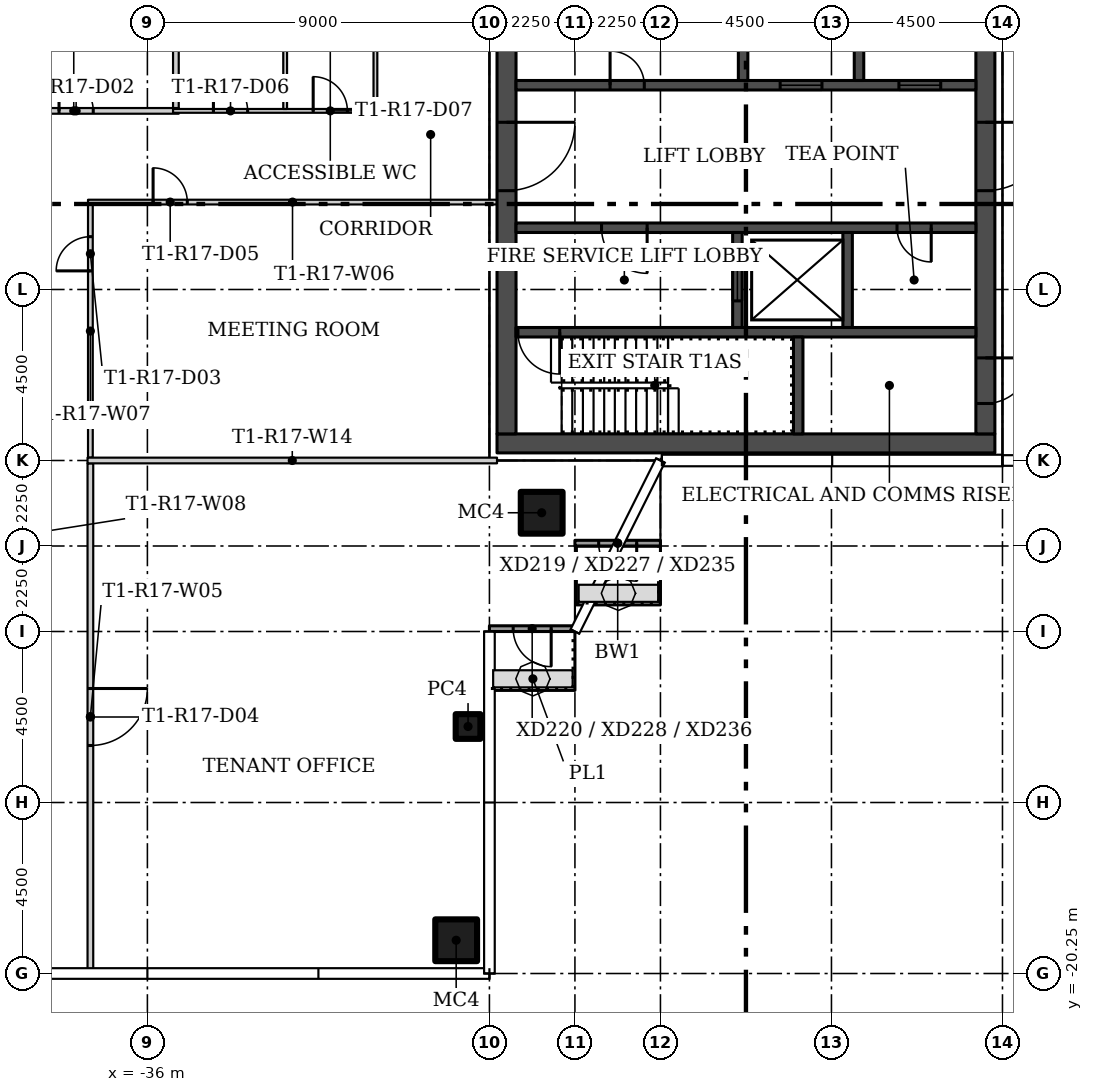
"""IFC4 building model, lengths in metres.
Left out: names, types, materials, properties, quantities, classifications, styles, units other than length and angle.
Written with IfcOpenShell. Run it as: python <this file> out.ifc"""

import sys

from ifc_helpers import new_model, si_unit, direction, frame, frame_2d, origin, origin_2d, place, context, subcontext, project, spatial, rectangle, hollow_rectangle, extrude, element, fill, save


model = new_model("IFC4")
c1 = context("Model", 3, precision=1e-05, world=origin(), true_north=direction((0.0, 1.0)))
c2 = subcontext(c1, "Body", "Model", "MODEL_VIEW")
j1 = project(units=[si_unit("LENGTHUNIT", "METRE"), si_unit("PLANEANGLEUNIT", "RADIAN")], contexts=[c1])
p1 = place(None, origin())
s1 = spatial("IfcSite", under=j1, at=p1, CompositionType="ELEMENT")
p2 = place(p1, origin())
s2 = spatial("IfcBuilding", under=s1, at=p2, CompositionType="ELEMENT")
p3 = place(p2, frame((0.0, 0.0, 150.6)))
s3 = spatial("IfcBuildingStorey", under=s2, at=p3, CompositionType="ELEMENT", Elevation=150.6)
p4 = place(p3, frame((-25.625, -8.125, 0.0)))
e1 = element("IfcColumn", 1, at=p4, inside=s3, PredefinedType="COLUMN", context=c2, shape_type="SweptSolid", body=[
    extrude(hollow_rectangle(XDim=1.1, YDim=1.1, WallThickness=0.04, at=origin_2d()), origin(), (0.0, 0.0, 1.0), 3.55),
])
p5 = place(p3, frame((-27.562, -13.75, 0.0)))
e2 = element("IfcColumn", 2, at=p5, inside=s3, PredefinedType="COLUMN", context=c2, shape_type="SweptSolid", body=[
    extrude(hollow_rectangle(XDim=0.65, YDim=0.65, WallThickness=0.02, at=origin_2d()), origin(), (0.0, 0.0, 1.0), 3.55),
])
p6 = place(p3, frame((-27.875, -19.375, 0.0)))
e3 = element("IfcColumn", 3, at=p6, inside=s3, PredefinedType="COLUMN", context=c2, shape_type="SweptSolid", body=[
    extrude(hollow_rectangle(XDim=1.1, YDim=1.1, WallThickness=0.04, at=origin_2d()), origin(), (0.0, 0.0, 1.0), 3.55),
])
p7 = place(p3, frame((-40.7, 2.45, 0.0)))
e4 = element("IfcWall", 4, at=p7, inside=s3, PredefinedType="PARTITIONING", context=c2, shape_type="SweptSolid", body=[
    extrude(rectangle(XDim=5.525, YDim=0.15, at=frame_2d((2.762, 0.0))), origin(), (0.0, 0.0, 1.0), 3.55),
])
p8 = place(p7, frame((2.375, 0.0, 0.0)))
e5 = element("IfcOpeningElement", 5, at=p8, cuts=e4, PredefinedType="OPENING", context=c2, shape_type="SweptSolid", body=[
    extrude(rectangle(XDim=0.9, YDim=2.1, at=frame_2d((0.45, 1.05))), frame((0.0, 0.085, 0.0), z_axis=(0.0, -1.0, 0.0), x_axis=(1.0, 0.0, 0.0)), (0.0, 0.0, 1.0), 0.17),
])
p9 = place(p3, frame((-35.325, 2.45, 0.0)))
e6 = element("IfcWall", 6, at=p9, inside=s3, PredefinedType="PARTITIONING", context=c2, shape_type="SweptSolid", body=[
    extrude(rectangle(XDim=5.375, YDim=0.1, at=frame_2d((2.688, 0.0))), origin(), (0.0, 0.0, 1.0), 3.55),
])
p10 = place(p9, frame((1.062, 0.0, 0.0)))
e7 = element("IfcOpeningElement", 7, at=p10, cuts=e6, PredefinedType="OPENING", context=c2, shape_type="SweptSolid", body=[
    extrude(rectangle(XDim=0.9, YDim=2.1, at=frame_2d((0.45, 1.05))), frame((0.0, 0.06, 0.0), z_axis=(0.0, -1.0, 0.0), x_axis=(1.0, 0.0, 0.0)), (0.0, 0.0, 1.0), 0.12),
])
p11 = place(p9, frame((3.688, 0.0, 0.0)))
e8 = element("IfcOpeningElement", 8, at=p11, cuts=e6, PredefinedType="OPENING", context=c2, shape_type="SweptSolid", body=[
    extrude(rectangle(XDim=0.9, YDim=2.1, at=frame_2d((0.45, 1.05))), frame((0.0, 0.06, 0.0), z_axis=(0.0, -1.0, 0.0), x_axis=(1.0, 0.0, 0.0)), (0.0, 0.0, 1.0), 0.12),
])
p12 = place(p3, frame((-30.0, 2.5, 0.0), z_axis=(0.0, 0.0, 1.0), x_axis=(0.0, 1.0, 0.0)))
e9 = element("IfcWall", 9, at=p12, inside=s3, PredefinedType="PARTITIONING", context=c2, shape_type="SweptSolid", body=[
    extrude(rectangle(XDim=4.175, YDim=0.1, at=frame_2d((2.087, 0.0))), origin(), (0.0, 0.0, 1.0), 3.55),
])
p13 = place(p3, frame((-37.5, -6.825, 0.0), z_axis=(0.0, 0.0, 1.0), x_axis=(0.0, -1.0, 0.0)))
e10 = element("IfcWall", 10, at=p13, inside=s3, PredefinedType="PARTITIONING", context=c2, shape_type="SweptSolid", body=[
    extrude(rectangle(XDim=13.33, YDim=0.15, at=frame_2d((6.665, 0.0))), origin(), (0.0, 0.0, 1.0), 3.55),
])
p14 = place(p13, frame((5.925, 0.0, 0.0)))
e11 = element("IfcOpeningElement", 11, at=p14, cuts=e10, PredefinedType="OPENING", context=c2, shape_type="SweptSolid", body=[
    extrude(rectangle(XDim=1.5, YDim=2.1, at=frame_2d((0.75, 1.05))), frame((0.0, 0.085, 0.0), z_axis=(0.0, -1.0, 0.0), x_axis=(1.0, 0.0, 0.0)), (0.0, 0.0, 1.0), 0.17),
])
p15 = place(p3, frame((-37.562, 0.05, 0.0)))
e12 = element("IfcWall", 12, at=p15, inside=s3, PredefinedType="PARTITIONING", context=c2, shape_type="SweptSolid", body=[
    extrude(rectangle(XDim=10.762, YDim=0.125, at=frame_2d((5.381, 0.0))), origin(), (0.0, 0.0, 1.0), 3.55),
])
p16 = place(p15, frame((1.712, 0.0, 0.0)))
e13 = element("IfcOpeningElement", 13, at=p16, cuts=e12, PredefinedType="OPENING", context=c2, shape_type="SweptSolid", body=[
    extrude(rectangle(XDim=0.9, YDim=2.1, at=frame_2d((0.45, 1.05))), frame((0.0, 0.073, 0.0), z_axis=(0.0, -1.0, 0.0), x_axis=(1.0, 0.0, 0.0)), (0.0, 0.0, 1.0), 0.145),
])
p17 = place(p3, frame((-37.5, -6.675, 0.0), z_axis=(0.0, 0.0, 1.0), x_axis=(0.0, 1.0, 0.0)))
e14 = element("IfcWall", 14, at=p17, inside=s3, PredefinedType="PARTITIONING", context=c2, shape_type="SweptSolid", body=[
    extrude(rectangle(XDim=6.662, YDim=0.125, at=frame_2d((3.331, 0.0))), origin(), (0.0, 0.0, 1.0), 3.55),
])
p18 = place(p17, frame((4.915, 0.0, 0.0)))
e15 = element("IfcOpeningElement", 15, at=p18, cuts=e14, PredefinedType="OPENING", context=c2, shape_type="SweptSolid", body=[
    extrude(rectangle(XDim=0.9, YDim=2.1, at=frame_2d((0.45, 1.05))), frame((0.0, 0.073, 0.0), z_axis=(0.0, -1.0, 0.0), x_axis=(1.0, 0.0, 0.0)), (0.0, 0.0, 1.0), 0.145),
])
p19 = place(p3, frame((-35.25, 2.525, 0.0), z_axis=(0.0, 0.0, 1.0), x_axis=(0.0, 1.0, 0.0)))
e16 = element("IfcWall", 16, at=p19, inside=s3, PredefinedType="PARTITIONING", context=c2, shape_type="SweptSolid", body=[
    extrude(rectangle(XDim=4.15, YDim=0.15, at=frame_2d((2.075, 0.0))), origin(), (0.0, 0.0, 1.0), 3.55),
])
p20 = place(p3, frame((-32.375, 2.5, 0.0), z_axis=(0.0, 0.0, 1.0), x_axis=(0.0, 1.0, 0.0)))
e17 = element("IfcWall", 17, at=p20, inside=s3, PredefinedType="PARTITIONING", context=c2, shape_type="SweptSolid", body=[
    extrude(rectangle(XDim=4.175, YDim=0.1, at=frame_2d((2.087, 0.0))), origin(), (0.0, 0.0, 1.0), 3.55),
])
p21 = place(p3, frame((-26.8, -6.75, 0.0), z_axis=(0.0, 0.0, 1.0), x_axis=(-1.0, 0.0, 0.0)))
e18 = element("IfcWall", 18, at=p21, inside=s3, PredefinedType="PARTITIONING", context=c2, shape_type="SweptSolid", body=[
    extrude(rectangle(XDim=10.775, YDim=0.15, at=frame_2d((5.387, 0.0))), origin(), (0.0, 0.0, 1.0), 3.55),
])
p22 = place(p3, frame((-22.5, -8.925, 0.0), z_axis=(0.0, 0.0, 1.0), x_axis=(-1.0, 0.0, 0.0)))
e19 = element("IfcWall", 19, at=p22, inside=s3, PredefinedType="SOLIDWALL", context=c2, shape_type="SweptSolid", body=[
    extrude(rectangle(XDim=2.25, YDim=0.15, at=frame_2d((1.125, 0.0))), origin(), (0.0, 0.0, 1.0), 3.45),
])
p23 = place(p22, frame((0.625, 0.0, 0.0)))
e20 = element("IfcOpeningElement", 20, at=p23, cuts=e19, PredefinedType="OPENING", context=c2, shape_type="SweptSolid", body=[
    extrude(rectangle(XDim=1.0, YDim=2.4, at=frame_2d((0.5, 1.2))), frame((0.0, 0.085, 0.0), z_axis=(0.0, -1.0, 0.0), x_axis=(1.0, 0.0, 0.0)), (0.0, 0.0, 1.0), 0.17),
])
p24 = place(p3, frame((-24.75, -11.175, 0.0), z_axis=(0.0, 0.0, 1.0), x_axis=(-1.0, 0.0, 0.0)))
e21 = element("IfcWall", 21, at=p24, inside=s3, PredefinedType="SOLIDWALL", context=c2, shape_type="SweptSolid", body=[
    extrude(rectangle(XDim=2.25, YDim=0.15, at=frame_2d((1.125, 0.0))), origin(), (0.0, 0.0, 1.0), 3.45),
])
p25 = place(p24, frame((0.625, 0.0, 0.0)))
e22 = element("IfcOpeningElement", 22, at=p25, cuts=e21, PredefinedType="OPENING", context=c2, shape_type="SweptSolid", body=[
    extrude(rectangle(XDim=1.0, YDim=2.4, at=frame_2d((0.5, 1.2))), frame((0.0, 0.085, 0.0), z_axis=(0.0, -1.0, 0.0), x_axis=(1.0, 0.0, 0.0)), (0.0, 0.0, 1.0), 0.17),
])
p26 = place(p3, frame((-26.8, -6.3, 0.0)))
e23 = element("IfcWall", 23, at=p26, inside=s3, PredefinedType="SHEAR", context=c2, shape_type="SweptSolid", body=[
    extrude(rectangle(XDim=13.1, YDim=0.5, at=frame_2d((6.55, 0.0))), origin(), (0.0, 0.0, 1.0), 3.55),
])
p27 = place(p3, frame((-26.55, 6.05, 0.0), z_axis=(0.0, 0.0, 1.0), x_axis=(0.0, -1.0, 0.0)))
e24 = element("IfcWall", 24, at=p27, inside=s3, PredefinedType="SHEAR", context=c2, shape_type="SweptSolid", body=[
    extrude(rectangle(XDim=12.1, YDim=0.5, at=frame_2d((6.05, 0.0))), origin(), (0.0, 0.0, 1.0), 3.55),
])
p28 = place(p27, frame((3.9, 0.0, 0.0)))
e25 = element("IfcOpeningElement", 25, at=p28, cuts=e24, PredefinedType="OPENING", context=c2, shape_type="SweptSolid", body=[
    extrude(rectangle(XDim=1.8, YDim=2.4, at=frame_2d((0.9, 1.2))), frame((0.0, 0.26, 0.0), z_axis=(0.0, -1.0, 0.0), x_axis=(1.0, 0.0, 0.0)), (0.0, 0.0, 1.0), 0.52),
])
p29 = place(p3, frame((-13.95, 6.05, 0.0), z_axis=(0.0, 0.0, 1.0), x_axis=(0.0, -1.0, 0.0)))
e26 = element("IfcWall", 26, at=p29, inside=s3, PredefinedType="SHEAR", context=c2, shape_type="SweptSolid", body=[
    extrude(rectangle(XDim=12.1, YDim=0.5, at=frame_2d((6.05, 0.0))), origin(), (0.0, 0.0, 1.0), 3.55),
])
p30 = place(p29, frame((10.1, 0.0, 0.0)))
e27 = element("IfcOpeningElement", 27, at=p30, cuts=e26, PredefinedType="OPENING", context=c2, shape_type="SweptSolid", body=[
    extrude(rectangle(XDim=1.2, YDim=2.1, at=frame_2d((0.6, 1.05))), frame((0.0, 0.26, 0.0), z_axis=(0.0, -1.0, 0.0), x_axis=(1.0, 0.0, 0.0)), (0.0, 0.0, 1.0), 0.52),
])
p31 = place(p29, frame((3.9, 0.0, 0.0)))
e28 = element("IfcOpeningElement", 28, at=p31, cuts=e26, PredefinedType="OPENING", context=c2, shape_type="SweptSolid", body=[
    extrude(rectangle(XDim=1.8, YDim=2.4, at=frame_2d((0.9, 1.2))), frame((0.0, 0.26, 0.0), z_axis=(0.0, -1.0, 0.0), x_axis=(1.0, 0.0, 0.0)), (0.0, 0.0, 1.0), 0.52),
])
p32 = place(p3, frame((-14.2, -3.375, 0.0), z_axis=(0.0, 0.0, 1.0), x_axis=(-1.0, 0.0, 0.0)))
e29 = element("IfcWall", 29, at=p32, inside=s3, PredefinedType="SHEAR", context=c2, shape_type="SweptSolid", body=[
    extrude(rectangle(XDim=12.1, YDim=0.25, at=frame_2d((6.05, 0.0))), origin(), (0.0, 0.0, 1.0), 3.55),
])
p33 = place(p32, frame((10.95, 0.0, 0.0)))
e30 = element("IfcOpeningElement", 30, at=p33, cuts=e29, PredefinedType="OPENING", context=c2, shape_type="SweptSolid", body=[
    extrude(rectangle(XDim=1.1, YDim=2.1, at=frame_2d((0.55, 1.05))), frame((0.0, 0.135, 0.0), z_axis=(0.0, -1.0, 0.0), x_axis=(1.0, 0.0, 0.0)), (0.0, 0.0, 1.0), 0.27),
])
p34 = place(p3, frame((-18.875, -6.05, 0.0), z_axis=(0.0, 0.0, 1.0), x_axis=(0.0, 1.0, 0.0)))
e31 = element("IfcWall", 31, at=p34, inside=s3, PredefinedType="SHEAR", context=c2, shape_type="SweptSolid", body=[
    extrude(rectangle(XDim=2.55, YDim=0.25, at=frame_2d((1.275, 0.0))), origin(), (0.0, 0.0, 1.0), 3.55),
])
p35 = place(p3, frame((-14.2, -0.625, 0.0), z_axis=(0.0, 0.0, 1.0), x_axis=(-1.0, 0.0, 0.0)))
e32 = element("IfcWall", 32, at=p35, inside=s3, PredefinedType="SHEAR", context=c2, shape_type="SweptSolid", body=[
    extrude(rectangle(XDim=12.1, YDim=0.25, at=frame_2d((6.05, 0.0))), origin(), (0.0, 0.0, 1.0), 3.55),
])
p36 = place(p35, frame((8.65, 0.0, 0.0)))
e33 = element("IfcOpeningElement", 33, at=p36, cuts=e32, PredefinedType="OPENING", context=c2, shape_type="SweptSolid", body=[
    extrude(rectangle(XDim=1.2, YDim=2.1, at=frame_2d((0.6, 1.05))), frame((0.0, 0.135, 0.0), z_axis=(0.0, -1.0, 0.0), x_axis=(1.0, 0.0, 0.0)), (0.0, 0.0, 1.0), 0.27),
])
p37 = place(p35, frame((1.175, 0.0, 0.0)))
e34 = element("IfcOpeningElement", 34, at=p37, cuts=e32, PredefinedType="OPENING", context=c2, shape_type="SweptSolid", body=[
    extrude(rectangle(XDim=0.9, YDim=2.1, at=frame_2d((0.45, 1.05))), frame((0.0, 0.135, 0.0), z_axis=(0.0, -1.0, 0.0), x_axis=(1.0, 0.0, 0.0)), (0.0, 0.0, 1.0), 0.27),
])
p38 = place(p3, frame((-20.475, -3.25, 0.0), z_axis=(0.0, 0.0, 1.0), x_axis=(0.0, 1.0, 0.0)))
e35 = element("IfcWall", 35, at=p38, inside=s3, PredefinedType="SHEAR", context=c2, shape_type="SweptSolid", body=[
    extrude(rectangle(XDim=2.5, YDim=0.25, at=frame_2d((1.25, 0.0))), origin(), (0.0, 0.0, 1.0), 3.55),
])
p39 = place(p38, frame((0.7, 0.0, 0.0)))
e36 = element("IfcOpeningElement", 36, at=p39, cuts=e35, PredefinedType="OPENING", context=c2, shape_type="SweptSolid", body=[
    extrude(rectangle(XDim=1.1, YDim=2.1, at=frame_2d((0.55, 1.05))), frame((0.0, 0.135, 0.0), z_axis=(0.0, -1.0, 0.0), x_axis=(1.0, 0.0, 0.0)), (0.0, 0.0, 1.0), 0.27),
])
p40 = place(p3, frame((-17.575, -3.25, 0.0), z_axis=(0.0, 0.0, 1.0), x_axis=(0.0, 1.0, 0.0)))
e37 = element("IfcWall", 37, at=p40, inside=s3, PredefinedType="SHEAR", context=c2, shape_type="SweptSolid", body=[
    extrude(rectangle(XDim=2.5, YDim=0.25, at=frame_2d((1.25, 0.0))), origin(), (0.0, 0.0, 1.0), 3.55),
])
p41 = place(p3, frame((-26.3, 3.125, 0.0)))
e38 = element("IfcWall", 38, at=p41, inside=s3, PredefinedType="SHEAR", context=c2, shape_type="SweptSolid", body=[
    extrude(rectangle(XDim=12.1, YDim=0.25, at=frame_2d((6.05, 0.0))), origin(), (0.0, 0.0, 1.0), 3.55),
])
p42 = place(p41, frame((6.95, 0.0, 0.0)))
e39 = element("IfcOpeningElement", 39, at=p42, cuts=e38, PredefinedType="OPENING", context=c2, shape_type="SweptSolid", body=[
    extrude(rectangle(XDim=1.1, YDim=2.1, at=frame_2d((0.55, 1.05))), frame((0.0, 0.135, 0.0), z_axis=(0.0, -1.0, 0.0), x_axis=(1.0, 0.0, 0.0)), (0.0, 0.0, 1.0), 0.27),
])
p43 = place(p41, frame((10.075, 0.0, 0.0)))
e40 = element("IfcOpeningElement", 40, at=p43, cuts=e38, PredefinedType="OPENING", context=c2, shape_type="SweptSolid", body=[
    extrude(rectangle(XDim=1.1, YDim=2.1, at=frame_2d((0.55, 1.05))), frame((0.0, 0.135, 0.0), z_axis=(0.0, -1.0, 0.0), x_axis=(1.0, 0.0, 0.0)), (0.0, 0.0, 1.0), 0.27),
])
p44 = place(p41, frame((2.475, 0.0, 0.0)))
e41 = element("IfcOpeningElement", 41, at=p44, cuts=e38, PredefinedType="OPENING", context=c2, shape_type="SweptSolid", body=[
    extrude(rectangle(XDim=0.9, YDim=2.1, at=frame_2d((0.45, 1.05))), frame((0.0, 0.135, 0.0), z_axis=(0.0, -1.0, 0.0), x_axis=(1.0, 0.0, 0.0)), (0.0, 0.0, 1.0), 0.27),
])
for number, where, z_axis, x_axis in (
    (42, (-20.325, 3.25, 0.0), (0.0, 0.0, 1.0), (0.0, 1.0, 0.0)),
    (43, (-17.275, 3.25, 0.0), (0.0, 0.0, 1.0), (0.0, 1.0, 0.0)),
):
    element("IfcWall", number, at=place(p3, frame(where, z_axis=z_axis, x_axis=x_axis)), inside=s3, PredefinedType="SHEAR", context=c2, shape_type="SweptSolid", body=[
        extrude(rectangle(XDim=2.8, YDim=0.25, at=frame_2d((1.4, 0.0))), origin(), (0.0, 0.0, 1.0), 3.55),
    ])
p45 = place(p8, origin())
e44 = element("IfcDoor", 44, at=p45, inside=s3, OperationType="SINGLE_SWING_RIGHT", PredefinedType="DOOR", context=c2, shape_type="SweptSolid", body=[
    extrude(rectangle(XDim=0.9, YDim=2.1, at=frame_2d((0.45, 1.05))), frame((0.0, 0.025, 0.0), z_axis=(0.0, -1.0, 0.0), x_axis=(1.0, 0.0, 0.0)), (0.0, 0.0, 1.0), 0.05),
])
fill(e5, e44)
p46 = place(p18, origin())
e45 = element("IfcDoor", 45, at=p46, inside=s3, OperationType="SINGLE_SWING_RIGHT", PredefinedType="DOOR", context=c2, shape_type="SweptSolid", body=[
    extrude(rectangle(XDim=0.9, YDim=2.1, at=frame_2d((0.45, 1.05))), frame((0.0, 0.025, 0.0), z_axis=(0.0, -1.0, 0.0), x_axis=(1.0, 0.0, 0.0)), (0.0, 0.0, 1.0), 0.05),
])
fill(e15, e45)
p47 = place(p14, origin())
e46 = element("IfcDoor", 46, at=p47, inside=s3, OperationType="DOUBLE_DOOR_SINGLE_SWING", PredefinedType="DOOR", context=c2, shape_type="SweptSolid", body=[
    extrude(rectangle(XDim=1.5, YDim=2.1, at=frame_2d((0.75, 1.05))), frame((0.0, 0.025, 0.0), z_axis=(0.0, -1.0, 0.0), x_axis=(1.0, 0.0, 0.0)), (0.0, 0.0, 1.0), 0.05),
])
fill(e11, e46)
p48 = place(p16, origin())
e47 = element("IfcDoor", 47, at=p48, inside=s3, OperationType="SINGLE_SWING_LEFT", PredefinedType="DOOR", context=c2, shape_type="SweptSolid", body=[
    extrude(rectangle(XDim=0.9, YDim=2.1, at=frame_2d((0.45, 1.05))), frame((0.0, 0.025, 0.0), z_axis=(0.0, -1.0, 0.0), x_axis=(1.0, 0.0, 0.0)), (0.0, 0.0, 1.0), 0.05),
])
fill(e13, e47)
p49 = place(p10, origin())
e48 = element("IfcDoor", 48, at=p49, inside=s3, OperationType="SINGLE_SWING_LEFT", PredefinedType="DOOR", context=c2, shape_type="SweptSolid", body=[
    extrude(rectangle(XDim=0.9, YDim=2.1, at=frame_2d((0.45, 1.05))), frame((0.0, 0.025, 0.0), z_axis=(0.0, -1.0, 0.0), x_axis=(1.0, 0.0, 0.0)), (0.0, 0.0, 1.0), 0.05),
])
fill(e7, e48)
p50 = place(p11, origin())
e49 = element("IfcDoor", 49, at=p50, inside=s3, OperationType="SINGLE_SWING_LEFT", PredefinedType="DOOR", context=c2, shape_type="SweptSolid", body=[
    extrude(rectangle(XDim=0.9, YDim=2.1, at=frame_2d((0.45, 1.05))), frame((0.0, 0.025, 0.0), z_axis=(0.0, -1.0, 0.0), x_axis=(1.0, 0.0, 0.0)), (0.0, 0.0, 1.0), 0.05),
])
fill(e8, e49)
p51 = place(p23, origin())
e50 = element("IfcDoor", 50, at=p51, inside=s3, OperationType="SINGLE_SWING_RIGHT", PredefinedType="DOOR", context=c2, shape_type="SweptSolid", body=[
    extrude(rectangle(XDim=1.0, YDim=2.4, at=frame_2d((0.5, 1.2))), frame((0.0, 0.025, 0.0), z_axis=(0.0, -1.0, 0.0), x_axis=(1.0, 0.0, 0.0)), (0.0, 0.0, 1.0), 0.05),
])
fill(e20, e50)
p52 = place(p25, origin())
e51 = element("IfcDoor", 51, at=p52, inside=s3, OperationType="SINGLE_SWING_LEFT", PredefinedType="DOOR", context=c2, shape_type="SweptSolid", body=[
    extrude(rectangle(XDim=1.0, YDim=2.4, at=frame_2d((0.5, 1.2))), frame((0.0, 0.025, 0.0), z_axis=(0.0, -1.0, 0.0), x_axis=(1.0, 0.0, 0.0)), (0.0, 0.0, 1.0), 0.05),
])
fill(e22, e51)
p53 = place(p28, origin())
e52 = element("IfcDoor", 52, at=p53, inside=s3, OperationType="DOUBLE_DOOR_SINGLE_SWING", PredefinedType="DOOR", context=c2, shape_type="SweptSolid", body=[
    extrude(rectangle(XDim=1.8, YDim=2.4, at=frame_2d((0.9, 1.2))), frame((0.0, 0.025, 0.0), z_axis=(0.0, -1.0, 0.0), x_axis=(1.0, 0.0, 0.0)), (0.0, 0.0, 1.0), 0.05),
])
fill(e25, e52)
p54 = place(p30, origin())
e53 = element("IfcDoor", 53, at=p54, inside=s3, OperationType="SINGLE_SWING_RIGHT", PredefinedType="DOOR", context=c2, shape_type="SweptSolid", body=[
    extrude(rectangle(XDim=1.2, YDim=2.1, at=frame_2d((0.6, 1.05))), frame((0.0, 0.025, 0.0), z_axis=(0.0, -1.0, 0.0), x_axis=(1.0, 0.0, 0.0)), (0.0, 0.0, 1.0), 0.05),
])
fill(e27, e53)
p55 = place(p31, origin())
e54 = element("IfcDoor", 54, at=p55, inside=s3, OperationType="DOUBLE_DOOR_SINGLE_SWING", PredefinedType="DOOR", context=c2, shape_type="SweptSolid", body=[
    extrude(rectangle(XDim=1.8, YDim=2.4, at=frame_2d((0.9, 1.2))), frame((0.0, 0.025, 0.0), z_axis=(0.0, -1.0, 0.0), x_axis=(1.0, 0.0, 0.0)), (0.0, 0.0, 1.0), 0.05),
])
fill(e28, e54)
p56 = place(p33, origin())
e55 = element("IfcDoor", 55, at=p56, inside=s3, OperationType="SINGLE_SWING_RIGHT", PredefinedType="DOOR", context=c2, shape_type="SweptSolid", body=[
    extrude(rectangle(XDim=1.1, YDim=2.1, at=frame_2d((0.55, 1.05))), frame((0.0, 0.025, 0.0), z_axis=(0.0, -1.0, 0.0), x_axis=(1.0, 0.0, 0.0)), (0.0, 0.0, 1.0), 0.05),
])
fill(e30, e55)
p57 = place(p36, origin())
e56 = element("IfcDoor", 56, at=p57, inside=s3, OperationType="SINGLE_SWING_RIGHT", PredefinedType="DOOR", context=c2, shape_type="SweptSolid", body=[
    extrude(rectangle(XDim=1.2, YDim=2.1, at=frame_2d((0.6, 1.05))), frame((0.0, 0.025, 0.0), z_axis=(0.0, -1.0, 0.0), x_axis=(1.0, 0.0, 0.0)), (0.0, 0.0, 1.0), 0.05),
])
fill(e33, e56)
p58 = place(p37, origin())
e57 = element("IfcDoor", 57, at=p58, inside=s3, OperationType="SINGLE_SWING_LEFT", PredefinedType="DOOR", context=c2, shape_type="SweptSolid", body=[
    extrude(rectangle(XDim=0.9, YDim=2.1, at=frame_2d((0.45, 1.05))), frame((0.0, 0.025, 0.0), z_axis=(0.0, -1.0, 0.0), x_axis=(1.0, 0.0, 0.0)), (0.0, 0.0, 1.0), 0.05),
])
fill(e34, e57)
p59 = place(p39, origin())
e58 = element("IfcDoor", 58, at=p59, inside=s3, OperationType="SLIDING_TO_LEFT", PredefinedType="DOOR", context=c2, shape_type="SweptSolid", body=[
    extrude(rectangle(XDim=1.1, YDim=2.1, at=frame_2d((0.55, 1.05))), frame((0.0, 0.025, 0.0), z_axis=(0.0, -1.0, 0.0), x_axis=(1.0, 0.0, 0.0)), (0.0, 0.0, 1.0), 0.05),
])
fill(e36, e58)
p60 = place(p42, origin())
e59 = element("IfcDoor", 59, at=p60, inside=s3, OperationType="SLIDING_TO_LEFT", PredefinedType="DOOR", context=c2, shape_type="SweptSolid", body=[
    extrude(rectangle(XDim=1.1, YDim=2.1, at=frame_2d((0.55, 1.05))), frame((0.0, 0.025, 0.0), z_axis=(0.0, -1.0, 0.0), x_axis=(1.0, 0.0, 0.0)), (0.0, 0.0, 1.0), 0.05),
])
fill(e39, e59)
p61 = place(p43, origin())
e60 = element("IfcDoor", 60, at=p61, inside=s3, OperationType="SLIDING_TO_LEFT", PredefinedType="DOOR", context=c2, shape_type="SweptSolid", body=[
    extrude(rectangle(XDim=1.1, YDim=2.1, at=frame_2d((0.55, 1.05))), frame((0.0, 0.025, 0.0), z_axis=(0.0, -1.0, 0.0), x_axis=(1.0, 0.0, 0.0)), (0.0, 0.0, 1.0), 0.05),
])
fill(e40, e60)
p62 = place(p44, origin())
e61 = element("IfcDoor", 61, at=p62, inside=s3, OperationType="SINGLE_SWING_LEFT", PredefinedType="DOOR", context=c2, shape_type="SweptSolid", body=[
    extrude(rectangle(XDim=0.9, YDim=2.1, at=frame_2d((0.45, 1.05))), frame((0.0, 0.025, 0.0), z_axis=(0.0, -1.0, 0.0), x_axis=(1.0, 0.0, 0.0)), (0.0, 0.0, 1.0), 0.05),
])
fill(e41, e61)
save(model, sys.argv[1])
